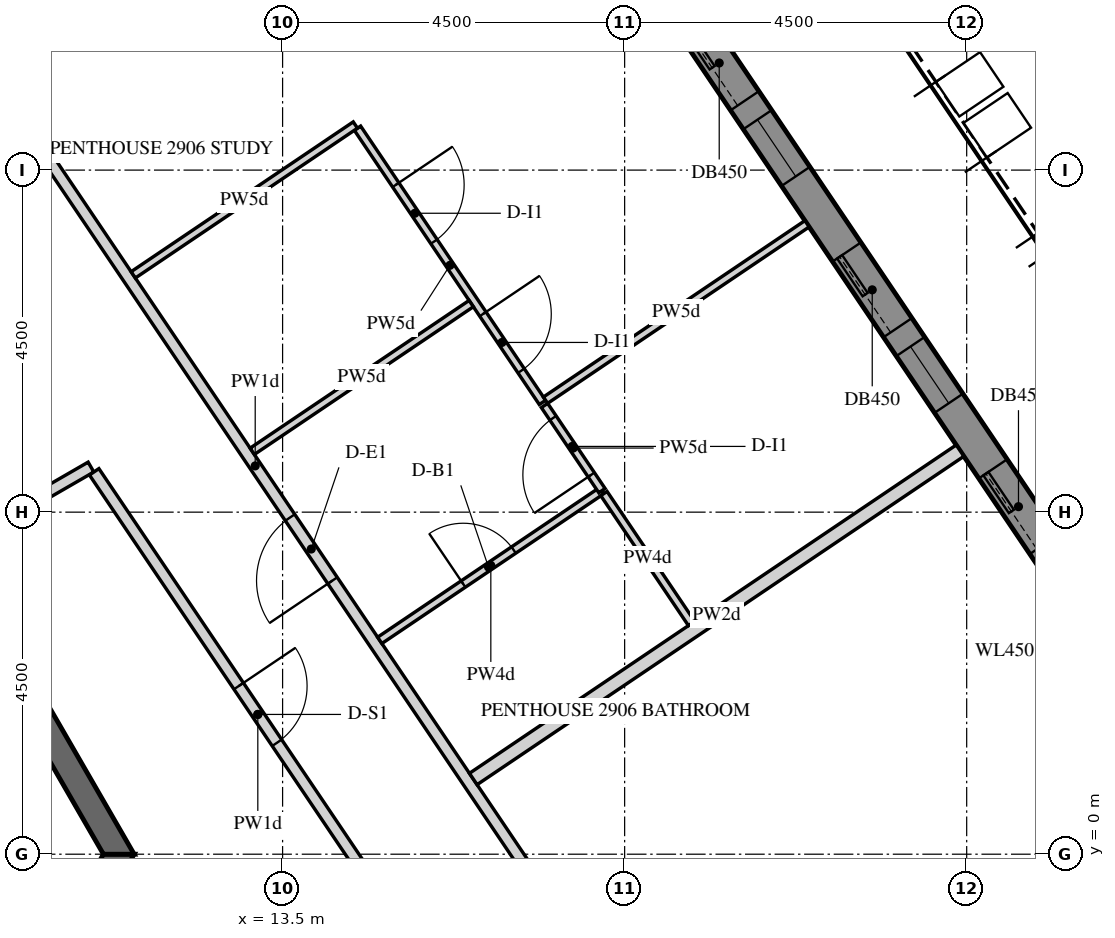
"""IFC4 building model, lengths in metres.
Left out: names, types, materials, properties, quantities, classifications, styles, units other than length and angle.
Written with IfcOpenShell. Run it as: python <this file> out.ifc"""

import sys

from ifc_helpers import new_model, si_unit, direction, frame, frame_2d, origin, place, context, subcontext, project, spatial, polyline, rectangle, outline, extrude, element, fill, save


model = new_model("IFC4")
c1 = context("Model", 3, precision=1e-05, world=origin(), true_north=direction((0.0, 1.0)))
c2 = subcontext(c1, "Body", "Model", "MODEL_VIEW")
j1 = project(units=[si_unit("LENGTHUNIT", "METRE"), si_unit("PLANEANGLEUNIT", "RADIAN")], contexts=[c1])
p1 = place(None, origin())
s1 = spatial("IfcSite", under=j1, at=p1, CompositionType="ELEMENT")
p2 = place(p1, origin())
s2 = spatial("IfcBuilding", under=s1, at=p2, CompositionType="ELEMENT")
p3 = place(p2, frame((0.0, 0.0, 369.0)))
s3 = spatial("IfcBuildingStorey", under=s2, at=p3, CompositionType="ELEMENT", Elevation=369.0)
p4 = place(p3, frame((24.37, 2.811, -0.15), z_axis=(0.0, 0.0, 1.0), x_axis=(-0.559187034749, 0.829041531027, 0.0)))
e1 = element("IfcWall", 1, at=p4, inside=s3, PredefinedType="SOLIDWALL", context=c2, shape_type="SweptSolid", body=[
    extrude(outline(polyline([(0.225, -0.225), (20.506, -0.225), (20.957, 0.225), (-0.225, 0.225), (0.225, -0.225)])), origin(), (0.0, 0.0, 1.0), 3.9),
])
p5 = place(p4, frame((0.325, 0.0, 1.05)))
e2 = element("IfcOpeningElement", 2, at=p5, cuts=e1, PredefinedType="OPENING", context=c2, shape_type="SweptSolid", body=[
    extrude(rectangle(XDim=0.9, YDim=1.5, at=frame_2d((0.45, 0.75))), frame((0.0, 0.235, 0.0), z_axis=(0.0, -1.0, 0.0), x_axis=(1.0, 0.0, 0.0)), (0.0, 0.0, 1.0), 0.47),
])
p6 = place(p4, frame((1.525, 0.0, 0.15)))
e3 = element("IfcOpeningElement", 3, at=p6, cuts=e1, PredefinedType="OPENING", context=c2, shape_type="SweptSolid", body=[
    extrude(rectangle(XDim=1.2, YDim=2.4, at=frame_2d((0.6, 1.2))), frame((0.0, 0.235, 0.0), z_axis=(0.0, -1.0, 0.0), x_axis=(1.0, 0.0, 0.0)), (0.0, 0.0, 1.0), 0.47),
])
p7 = place(p4, frame((3.766, 0.0, 1.05)))
e4 = element("IfcOpeningElement", 4, at=p7, cuts=e1, PredefinedType="OPENING", context=c2, shape_type="SweptSolid", body=[
    extrude(rectangle(XDim=0.9, YDim=1.5, at=frame_2d((0.45, 0.75))), frame((0.0, 0.235, 0.0), z_axis=(0.0, -1.0, 0.0), x_axis=(1.0, 0.0, 0.0)), (0.0, 0.0, 1.0), 0.47),
])
p8 = place(p4, frame((4.966, 0.0, 0.15)))
e5 = element("IfcOpeningElement", 5, at=p8, cuts=e1, PredefinedType="OPENING", context=c2, shape_type="SweptSolid", body=[
    extrude(rectangle(XDim=1.2, YDim=2.4, at=frame_2d((0.6, 1.2))), frame((0.0, 0.235, 0.0), z_axis=(0.0, -1.0, 0.0), x_axis=(1.0, 0.0, 0.0)), (0.0, 0.0, 1.0), 0.47),
])
p9 = place(p4, frame((7.366, 0.0, 1.05)))
e6 = element("IfcOpeningElement", 6, at=p9, cuts=e1, PredefinedType="OPENING", context=c2, shape_type="SweptSolid", body=[
    extrude(rectangle(XDim=0.9, YDim=1.5, at=frame_2d((0.45, 0.75))), frame((0.0, 0.235, 0.0), z_axis=(0.0, -1.0, 0.0), x_axis=(1.0, 0.0, 0.0)), (0.0, 0.0, 1.0), 0.47),
])
p10 = place(p4, frame((8.566, 0.0, 0.15)))
e7 = element("IfcOpeningElement", 7, at=p10, cuts=e1, PredefinedType="OPENING", context=c2, shape_type="SweptSolid", body=[
    extrude(rectangle(XDim=1.2, YDim=2.4, at=frame_2d((0.6, 1.2))), frame((0.0, 0.235, 0.0), z_axis=(0.0, -1.0, 0.0), x_axis=(1.0, 0.0, 0.0)), (0.0, 0.0, 1.0), 0.47),
])
p11 = place(p4, frame((10.966, 0.0, 1.05)))
e8 = element("IfcOpeningElement", 8, at=p11, cuts=e1, PredefinedType="OPENING", context=c2, shape_type="SweptSolid", body=[
    extrude(rectangle(XDim=0.9, YDim=1.5, at=frame_2d((0.45, 0.75))), frame((0.0, 0.235, 0.0), z_axis=(0.0, -1.0, 0.0), x_axis=(1.0, 0.0, 0.0)), (0.0, 0.0, 1.0), 0.47),
])
p12 = place(p4, frame((12.166, 0.0, 0.15)))
e9 = element("IfcOpeningElement", 9, at=p12, cuts=e1, PredefinedType="OPENING", context=c2, shape_type="SweptSolid", body=[
    extrude(rectangle(XDim=1.2, YDim=2.4, at=frame_2d((0.6, 1.2))), frame((0.0, 0.235, 0.0), z_axis=(0.0, -1.0, 0.0), x_axis=(1.0, 0.0, 0.0)), (0.0, 0.0, 1.0), 0.47),
])
p13 = place(p4, frame((14.566, 0.0, 1.05)))
e10 = element("IfcOpeningElement", 10, at=p13, cuts=e1, PredefinedType="OPENING", context=c2, shape_type="SweptSolid", body=[
    extrude(rectangle(XDim=0.9, YDim=1.5, at=frame_2d((0.45, 0.75))), frame((0.0, 0.235, 0.0), z_axis=(0.0, -1.0, 0.0), x_axis=(1.0, 0.0, 0.0)), (0.0, 0.0, 1.0), 0.47),
])
p14 = place(p4, frame((15.766, 0.0, 0.15)))
e11 = element("IfcOpeningElement", 11, at=p14, cuts=e1, PredefinedType="OPENING", context=c2, shape_type="SweptSolid", body=[
    extrude(rectangle(XDim=1.2, YDim=2.4, at=frame_2d((0.6, 1.2))), frame((0.0, 0.235, 0.0), z_axis=(0.0, -1.0, 0.0), x_axis=(1.0, 0.0, 0.0)), (0.0, 0.0, 1.0), 0.47),
])
p15 = place(p4, frame((18.007, 0.0, 1.05)))
e12 = element("IfcOpeningElement", 12, at=p15, cuts=e1, PredefinedType="OPENING", context=c2, shape_type="SweptSolid", body=[
    extrude(rectangle(XDim=0.9, YDim=1.5, at=frame_2d((0.45, 0.75))), frame((0.0, 0.235, 0.0), z_axis=(0.0, -1.0, 0.0), x_axis=(1.0, 0.0, 0.0)), (0.0, 0.0, 1.0), 0.47),
])
p16 = place(p4, frame((19.207, 0.0, 0.15)))
e13 = element("IfcOpeningElement", 13, at=p16, cuts=e1, PredefinedType="OPENING", context=c2, shape_type="SweptSolid", body=[
    extrude(rectangle(XDim=1.2, YDim=2.4, at=frame_2d((0.6, 1.2))), frame((0.0, 0.235, 0.0), z_axis=(0.0, -1.0, 0.0), x_axis=(1.0, 0.0, 0.0)), (0.0, 0.0, 1.0), 0.47),
])
p17 = place(p3, frame((5.673, -9.825, -0.15), z_axis=(0.0, 0.0, 1.0), x_axis=(0.499995046907, 0.866028263435, 0.0)))
e14 = element("IfcWall", 14, at=p17, inside=s3, PredefinedType="SHEAR", context=c2, shape_type="SweptSolid", body=[
    extrude(outline(polyline([(-0.101, -0.175), (11.446, -0.175), (11.244, 0.175), (0.101, 0.175), (-0.101, -0.175)])), origin(), (0.0, 0.0, 1.0), 3.9),
])
p18 = place(p17, frame((4.801, 0.0, 0.15)))
e15 = element("IfcOpeningElement", 15, at=p18, cuts=e14, PredefinedType="OPENING", context=c2, shape_type="SweptSolid", body=[
    extrude(rectangle(XDim=1.8, YDim=2.4, at=frame_2d((0.9, 1.2))), frame((0.0, 0.185, 0.0), z_axis=(0.0, -1.0, 0.0), x_axis=(1.0, 0.0, 0.0)), (0.0, 0.0, 1.0), 0.37),
])
p19 = place(p3, frame((11.345, 0.0, -0.15), z_axis=(0.0, 0.0, 1.0), x_axis=(-0.499995046907, 0.866028263435, 0.0)))
e16 = element("IfcWall", 16, at=p19, inside=s3, PredefinedType="SHEAR", context=c2, shape_type="SweptSolid", body=[
    extrude(outline(polyline([(-0.101, -0.175), (11.446, -0.175), (11.244, 0.175), (0.101, 0.175), (-0.101, -0.175)])), origin(), (0.0, 0.0, 1.0), 3.9),
])
p20 = place(p19, frame((4.744, 0.0, 0.15)))
e17 = element("IfcOpeningElement", 17, at=p20, cuts=e16, PredefinedType="OPENING", context=c2, shape_type="SweptSolid", body=[
    extrude(rectangle(XDim=1.8, YDim=2.4, at=frame_2d((0.9, 1.2))), frame((0.0, 0.185, 0.0), z_axis=(0.0, -1.0, 0.0), x_axis=(1.0, 0.0, 0.0)), (0.0, 0.0, 1.0), 0.37),
])
p21 = place(p3, frame((5.773, 10.0, -0.15), z_axis=(0.0, 0.0, 1.0), x_axis=(0.500007911273, 0.866020836161, 0.0)))
e18 = element("IfcWall", 18, at=p21, inside=s3, PredefinedType="SHEAR", context=c2, shape_type="SweptSolid", body=[
    extrude(rectangle(XDim=14.51, YDim=0.35, at=frame_2d((7.255, 0.0))), origin(), (0.0, 0.0, 1.0), 3.9),
])
p22 = place(p21, frame((6.355, 0.0, 0.15)))
e19 = element("IfcOpeningElement", 19, at=p22, cuts=e18, PredefinedType="OPENING", context=c2, shape_type="SweptSolid", body=[
    extrude(rectangle(XDim=1.8, YDim=2.4, at=frame_2d((0.9, 1.2))), frame((0.0, 0.185, 0.0), z_axis=(0.0, -1.0, 0.0), x_axis=(1.0, 0.0, 0.0)), (0.0, 0.0, 1.0), 0.37),
])
p23 = place(p3, frame((17.401, -1.21, 0.0), z_axis=(0.0, 0.0, 1.0), x_axis=(-0.559186729505, 0.829041736914, 0.0)))
e20 = element("IfcWall", 20, at=p23, inside=s3, PredefinedType="PARTITIONING", context=c2, shape_type="SweptSolid", body=[
    extrude(rectangle(XDim=15.243, YDim=0.15, at=frame_2d((7.621, 0.0))), origin(), (0.0, 0.0, 1.0), 2.47),
])
p24 = place(p23, frame((5.802, 0.0, 0.0)))
e21 = element("IfcOpeningElement", 21, at=p24, cuts=e20, PredefinedType="OPENING", context=c2, shape_type="SweptSolid", body=[
    extrude(rectangle(XDim=1.0, YDim=2.1, at=frame_2d((0.5, 1.05))), frame((0.0, 0.085, 0.0), z_axis=(0.0, -1.0, 0.0), x_axis=(1.0, 0.0, 0.0)), (0.0, 0.0, 1.0), 0.17),
])
p25 = place(p3, frame((9.2, 4.066, 0.0), z_axis=(0.0, 0.0, 1.0), x_axis=(0.866011447264, 0.500024172624, 0.0)))
e22 = element("IfcWall", 22, at=p25, inside=s3, PredefinedType="PARTITIONING", context=c2, shape_type="SweptSolid", body=[
    extrude(rectangle(XDim=2.055, YDim=0.15, at=frame_2d((1.027, 0.0))), origin(), (0.0, 0.0, 1.0), 2.47),
])
p26 = place(p3, frame((11.021, 5.031, 0.0), z_axis=(0.0, 0.0, 1.0), x_axis=(0.559191842266, -0.829038288346, 0.0)))
e23 = element("IfcWall", 23, at=p26, inside=s3, PredefinedType="PARTITIONING", context=c2, shape_type="SweptSolid", body=[
    extrude(rectangle(XDim=7.7, YDim=0.15, at=frame_2d((3.85, 0.0))), origin(), (0.0, 0.0, 1.0), 2.47),
])
p27 = place(p26, frame((3.4, 0.0, 0.0)))
e24 = element("IfcOpeningElement", 24, at=p27, cuts=e23, PredefinedType="OPENING", context=c2, shape_type="SweptSolid", body=[
    extrude(rectangle(XDim=0.9, YDim=2.1, at=frame_2d((0.45, 1.05))), frame((0.0, 0.085, 0.0), z_axis=(0.0, -1.0, 0.0), x_axis=(1.0, 0.0, 0.0)), (0.0, 0.0, 1.0), 0.17),
])
p28 = place(p3, frame((22.413, 5.309, 0.0), z_axis=(0.0, 0.0, 1.0), x_axis=(-0.82903328576, -0.559199258853, 0.0)))
e25 = element("IfcWall", 25, at=p28, inside=s3, PredefinedType="PARTITIONING", context=c2, shape_type="SweptSolid", body=[
    extrude(rectangle(XDim=7.725, YDim=0.18, at=frame_2d((3.863, 0.0))), origin(), (0.0, 0.0, 1.0), 2.47),
])
p29 = place(p3, frame((14.485, 9.552, 0.0), z_axis=(0.0, 0.0, 1.0), x_axis=(0.559171259418, -0.829052171242, 0.0)))
e26 = element("IfcWall", 26, at=p29, inside=s3, PredefinedType="PARTITIONING", context=c2, shape_type="SweptSolid", body=[
    extrude(rectangle(XDim=4.352, YDim=0.1, at=frame_2d((2.176, 0.0))), origin(), (0.0, 0.0, 1.0), 2.47),
])
p30 = place(p29, frame((2.95, 0.0, 0.0)))
e27 = element("IfcOpeningElement", 27, at=p30, cuts=e26, PredefinedType="OPENING", context=c2, shape_type="SweptSolid", body=[
    extrude(rectangle(XDim=0.9, YDim=2.1, at=frame_2d((0.45, 1.05))), frame((0.0, 0.06, 0.0), z_axis=(0.0, -1.0, 0.0), x_axis=(1.0, 0.0, 0.0)), (0.0, 0.0, 1.0), 0.12),
])
p31 = place(p29, frame((0.9, 0.0, 0.0)))
e28 = element("IfcOpeningElement", 28, at=p31, cuts=e26, PredefinedType="OPENING", context=c2, shape_type="SweptSolid", body=[
    extrude(rectangle(XDim=0.9, YDim=2.1, at=frame_2d((0.45, 1.05))), frame((0.0, 0.06, 0.0), z_axis=(0.0, -1.0, 0.0), x_axis=(1.0, 0.0, 0.0)), (0.0, 0.0, 1.0), 0.12),
])
p32 = place(p3, frame((16.959, 5.973, 0.0), z_axis=(0.0, 0.0, 1.0), x_axis=(0.829060712991, 0.559158594833, 0.0)))
e29 = element("IfcWall", 29, at=p32, inside=s3, PredefinedType="PARTITIONING", context=c2, shape_type="SweptSolid", body=[
    extrude(rectangle(XDim=4.15, YDim=0.1, at=frame_2d((2.075, 0.0))), origin(), (0.0, 0.0, 1.0), 2.47),
])
p33 = place(p3, frame((11.535, 7.622, 0.0), z_axis=(0.0, 0.0, 1.0), x_axis=(0.829033300448, 0.559199237078, 0.0)))
e30 = element("IfcWall", 30, at=p33, inside=s3, PredefinedType="PARTITIONING", context=c2, shape_type="SweptSolid", body=[
    extrude(rectangle(XDim=3.525, YDim=0.1, at=frame_2d((1.763, 0.0))), origin(), (0.0, 0.0, 1.0), 2.47),
])
p34 = place(p3, frame((14.778, 2.813, 0.0), z_axis=(0.0, 0.0, 1.0), x_axis=(0.829033300448, 0.559199237078, 0.0)))
e31 = element("IfcWall", 31, at=p34, inside=s3, PredefinedType="PARTITIONING", context=c2, shape_type="SweptSolid", body=[
    extrude(rectangle(XDim=3.525, YDim=0.1, at=frame_2d((1.763, 0.0))), origin(), (0.0, 0.0, 1.0), 2.47),
])
p35 = place(p34, frame((1.325, 0.0, 0.0)))
e32 = element("IfcOpeningElement", 32, at=p35, cuts=e31, PredefinedType="OPENING", context=c2, shape_type="SweptSolid", body=[
    extrude(rectangle(XDim=0.8, YDim=2.1, at=frame_2d((0.4, 1.05))), frame((0.0, 0.06, 0.0), z_axis=(0.0, -1.0, 0.0), x_axis=(1.0, 0.0, 0.0)), (0.0, 0.0, 1.0), 0.12),
])
p36 = place(p3, frame((17.702, 4.783, 0.0), z_axis=(0.0, 0.0, 1.0), x_axis=(-0.559150326391, 0.829066289567, 0.0)))
e33 = element("IfcWall", 33, at=p36, inside=s3, PredefinedType="PARTITIONING", context=c2, shape_type="SweptSolid", body=[
    extrude(rectangle(XDim=1.352, YDim=0.1, at=frame_2d((0.676, 0.0))), origin(), (0.0, 0.0, 1.0), 2.47),
])
p37 = place(p36, frame((0.252, 0.0, 0.0)))
e34 = element("IfcOpeningElement", 34, at=p37, cuts=e33, PredefinedType="OPENING", context=c2, shape_type="SweptSolid", body=[
    extrude(rectangle(XDim=0.9, YDim=2.1, at=frame_2d((0.45, 1.05))), frame((0.0, 0.06, 0.0), z_axis=(0.0, -1.0, 0.0), x_axis=(1.0, 0.0, 0.0)), (0.0, 0.0, 1.0), 0.12),
])
p38 = place(p3, frame((15.982, 7.244, 0.0), z_axis=(0.0, 0.0, 1.0), x_axis=(-0.829044102949, -0.559183221642, 0.0)))
e35 = element("IfcWall", 35, at=p38, inside=s3, PredefinedType="PARTITIONING", context=c2, shape_type="SweptSolid", body=[
    extrude(rectangle(XDim=3.475, YDim=0.1, at=frame_2d((1.737, 0.0))), origin(), (0.0, 0.0, 1.0), 2.47),
])
p39 = place(p3, frame((18.881, 3.035, 0.0), z_axis=(0.0, 0.0, 1.0), x_axis=(-0.559200338399, 0.829032557584, 0.0)))
e36 = element("IfcWall", 36, at=p39, inside=s3, PredefinedType="PARTITIONING", context=c2, shape_type="SweptSolid", body=[
    extrude(rectangle(XDim=2.062, YDim=0.1, at=frame_2d((1.031, 0.0))), origin(), (0.0, 0.0, 1.0), 2.47),
])
p40 = place(p6, frame((0.0, 0.15, 0.0)))
e37 = element("IfcDoor", 37, at=p40, inside=s3, OperationType="SLIDING_TO_LEFT", PredefinedType="DOOR", context=c2, shape_type="SweptSolid", body=[
    extrude(rectangle(XDim=1.2, YDim=2.4, at=frame_2d((0.6, 1.2))), frame((0.0, 0.025, 0.0), z_axis=(0.0, -1.0, 0.0), x_axis=(1.0, 0.0, 0.0)), (0.0, 0.0, 1.0), 0.05),
])
fill(e3, e37)
p41 = place(p7, frame((0.0, 0.155, 0.0)))
e38 = element("IfcWindow", 38, at=p41, inside=s3, PartitioningType="SINGLE_PANEL", PredefinedType="WINDOW", context=c2, shape_type="SweptSolid", body=[
    extrude(rectangle(XDim=0.9, YDim=1.5, at=frame_2d((0.45, 0.75))), frame((0.0, 0.03, 0.0), z_axis=(0.0, -1.0, 0.0), x_axis=(1.0, 0.0, 0.0)), (0.0, 0.0, 1.0), 0.06),
])
fill(e4, e38)
p42 = place(p8, frame((0.0, 0.15, 0.0)))
e39 = element("IfcDoor", 39, at=p42, inside=s3, OperationType="SLIDING_TO_LEFT", PredefinedType="DOOR", context=c2, shape_type="SweptSolid", body=[
    extrude(rectangle(XDim=1.2, YDim=2.4, at=frame_2d((0.6, 1.2))), frame((0.0, 0.025, 0.0), z_axis=(0.0, -1.0, 0.0), x_axis=(1.0, 0.0, 0.0)), (0.0, 0.0, 1.0), 0.05),
])
fill(e5, e39)
p43 = place(p9, frame((0.0, 0.155, 0.0)))
e40 = element("IfcWindow", 40, at=p43, inside=s3, PartitioningType="SINGLE_PANEL", PredefinedType="WINDOW", context=c2, shape_type="SweptSolid", body=[
    extrude(rectangle(XDim=0.9, YDim=1.5, at=frame_2d((0.45, 0.75))), frame((0.0, 0.03, 0.0), z_axis=(0.0, -1.0, 0.0), x_axis=(1.0, 0.0, 0.0)), (0.0, 0.0, 1.0), 0.06),
])
fill(e6, e40)
p44 = place(p10, frame((0.0, 0.15, 0.0)))
e41 = element("IfcDoor", 41, at=p44, inside=s3, OperationType="SLIDING_TO_LEFT", PredefinedType="DOOR", context=c2, shape_type="SweptSolid", body=[
    extrude(rectangle(XDim=1.2, YDim=2.4, at=frame_2d((0.6, 1.2))), frame((0.0, 0.025, 0.0), z_axis=(0.0, -1.0, 0.0), x_axis=(1.0, 0.0, 0.0)), (0.0, 0.0, 1.0), 0.05),
])
fill(e7, e41)
p45 = place(p24, origin())
e42 = element("IfcDoor", 42, at=p45, inside=s3, OperationType="SINGLE_SWING_RIGHT", PredefinedType="DOOR", context=c2, shape_type="SweptSolid", body=[
    extrude(rectangle(XDim=1.0, YDim=2.1, at=frame_2d((0.5, 1.05))), frame((0.0, 0.025, 0.0), z_axis=(0.0, -1.0, 0.0), x_axis=(1.0, 0.0, 0.0)), (0.0, 0.0, 1.0), 0.05),
])
fill(e21, e42)
p46 = place(p35, origin())
e43 = element("IfcDoor", 43, at=p46, inside=s3, OperationType="SINGLE_SWING_RIGHT", PredefinedType="DOOR", context=c2, shape_type="SweptSolid", body=[
    extrude(rectangle(XDim=0.8, YDim=2.1, at=frame_2d((0.4, 1.05))), frame((0.0, 0.025, 0.0), z_axis=(0.0, -1.0, 0.0), x_axis=(1.0, 0.0, 0.0)), (0.0, 0.0, 1.0), 0.05),
])
fill(e32, e43)
p47 = place(p30, origin())
e44 = element("IfcDoor", 44, at=p47, inside=s3, OperationType="SINGLE_SWING_RIGHT", PredefinedType="DOOR", context=c2, shape_type="SweptSolid", body=[
    extrude(rectangle(XDim=0.9, YDim=2.1, at=frame_2d((0.45, 1.05))), frame((0.0, 0.025, 0.0), z_axis=(0.0, -1.0, 0.0), x_axis=(1.0, 0.0, 0.0)), (0.0, 0.0, 1.0), 0.05),
])
fill(e27, e44)
p48 = place(p37, origin())
e45 = element("IfcDoor", 45, at=p48, inside=s3, OperationType="SINGLE_SWING_LEFT", PredefinedType="DOOR", context=c2, shape_type="SweptSolid", body=[
    extrude(rectangle(XDim=0.9, YDim=2.1, at=frame_2d((0.45, 1.05))), frame((0.0, 0.025, 0.0), z_axis=(0.0, -1.0, 0.0), x_axis=(1.0, 0.0, 0.0)), (0.0, 0.0, 1.0), 0.05),
])
fill(e34, e45)
p49 = place(p31, origin())
e46 = element("IfcDoor", 46, at=p49, inside=s3, OperationType="SINGLE_SWING_RIGHT", PredefinedType="DOOR", context=c2, shape_type="SweptSolid", body=[
    extrude(rectangle(XDim=0.9, YDim=2.1, at=frame_2d((0.45, 1.05))), frame((0.0, 0.025, 0.0), z_axis=(0.0, -1.0, 0.0), x_axis=(1.0, 0.0, 0.0)), (0.0, 0.0, 1.0), 0.05),
])
fill(e28, e46)
p50 = place(p27, origin())
e47 = element("IfcDoor", 47, at=p50, inside=s3, OperationType="SINGLE_SWING_LEFT", PredefinedType="DOOR", context=c2, shape_type="SweptSolid", body=[
    extrude(rectangle(XDim=0.9, YDim=2.1, at=frame_2d((0.45, 1.05))), frame((0.0, 0.025, 0.0), z_axis=(0.0, -1.0, 0.0), x_axis=(1.0, 0.0, 0.0)), (0.0, 0.0, 1.0), 0.05),
])
fill(e24, e47)
save(model, sys.argv[1])
